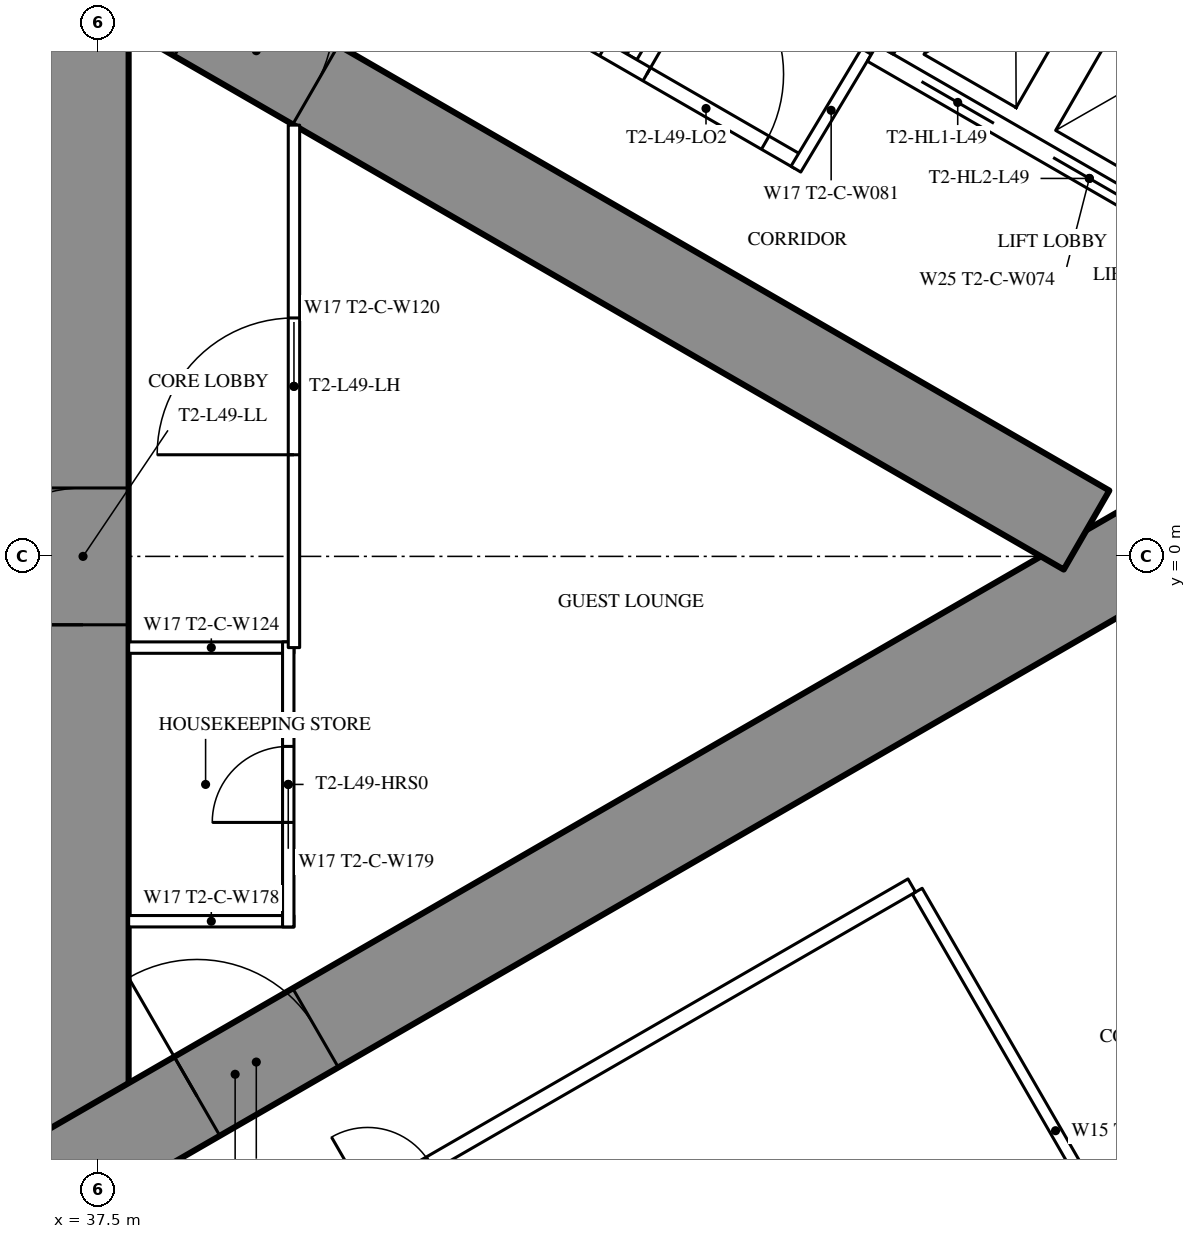
"""IFC4 building model, lengths in metres.
Left out: names, types, materials, properties, quantities, classifications, styles, units other than length and angle.
Written with IfcOpenShell. Run it as: python <this file> out.ifc"""

import sys

from ifc_helpers import new_model, si_unit, direction, frame, frame_2d, origin, place, context, subcontext, project, spatial, rectangle, extrude, element, fill, save


model = new_model("IFC4")
c1 = context("Model", 3, precision=1e-05, world=origin(), true_north=direction((0.0, 1.0)))
c2 = subcontext(c1, "Body", "Model", "MODEL_VIEW")
j1 = project(units=[si_unit("LENGTHUNIT", "METRE"), si_unit("PLANEANGLEUNIT", "RADIAN")], contexts=[c1])
p1 = place(None, origin())
s1 = spatial("IfcSite", under=j1, at=p1, CompositionType="ELEMENT")
p2 = place(p1, origin())
s2 = spatial("IfcBuilding", under=s1, at=p2, CompositionType="ELEMENT")
p3 = place(p2, frame((0.0, 0.0, 184.3)))
s3 = spatial("IfcBuildingStorey", under=s2, at=p3, CompositionType="ELEMENT", Elevation=184.3)
p4 = place(p3, frame((37.3, -8.6, 0.0), z_axis=(0.0, 0.0, 1.0), x_axis=(0.0, 1.0, 0.0)))
e1 = element("IfcWall", 1, at=p4, inside=s3, PredefinedType="SHEAR", context=c2, shape_type="SweptSolid", body=[
    extrude(rectangle(XDim=17.2, YDim=1.2, at=frame_2d((8.6, 0.0))), origin(), (0.0, 0.0, 1.0), 3.5),
])
p5 = place(p4, frame((7.7, 0.0, 0.0)))
e2 = element("IfcOpeningElement", 2, at=p5, cuts=e1, PredefinedType="OPENING", context=c2, shape_type="SweptSolid", body=[
    extrude(rectangle(XDim=1.8, YDim=2.2, at=frame_2d((0.9, 1.1))), frame((0.0, 0.61, 0.0), z_axis=(0.0, -1.0, 0.0), x_axis=(1.0, 0.0, 0.0)), (0.0, 0.0, 1.0), 1.22),
])
p6 = place(p3, frame((27.2, -13.8, 0.0), z_axis=(0.0, 0.0, 1.0), x_axis=(0.866027159892, 0.499996958321, 0.0)))
e3 = element("IfcWall", 3, at=p6, inside=s3, PredefinedType="SHEAR", context=c2, shape_type="SweptSolid", body=[
    extrude(rectangle(XDim=27.947, YDim=1.2, at=frame_2d((13.973, 0.0))), origin(), (0.0, 0.0, 1.0), 3.5),
])
p7 = place(p6, frame((4.6, 0.0, 0.0)))
e4 = element("IfcOpeningElement", 4, at=p7, cuts=e3, PredefinedType="OPENING", context=c2, shape_type="SweptSolid", body=[
    extrude(rectangle(XDim=1.0, YDim=2.2, at=frame_2d((0.5, 1.1))), frame((0.0, 0.61, 0.0), z_axis=(0.0, -1.0, 0.0), x_axis=(1.0, 0.0, 0.0)), (0.0, 0.0, 1.0), 1.22),
])
p8 = place(p6, frame((13.395, 0.0, 0.0)))
e5 = element("IfcOpeningElement", 5, at=p8, cuts=e3, PredefinedType="OPENING", context=c2, shape_type="SweptSolid", body=[
    extrude(rectangle(XDim=1.8, YDim=2.2, at=frame_2d((0.9, 1.1))), frame((0.0, 0.61, 0.0), z_axis=(0.0, -1.0, 0.0), x_axis=(1.0, 0.0, 0.0)), (0.0, 0.0, 1.0), 1.22),
])
p9 = place(p3, frame((27.2, 13.8, 0.0), z_axis=(0.0, 0.0, 1.0), x_axis=(0.866024515034, -0.500001539357, 0.0)))
e6 = element("IfcWall", 6, at=p9, inside=s3, PredefinedType="SHEAR", context=c2, shape_type="SweptSolid", body=[
    extrude(rectangle(XDim=26.907, YDim=1.2, at=frame_2d((13.454, 0.0))), origin(), (0.0, 0.0, 1.0), 3.5),
])
p10 = place(p9, frame((4.6, 0.0, 0.0)))
e7 = element("IfcOpeningElement", 7, at=p10, cuts=e6, PredefinedType="OPENING", context=c2, shape_type="SweptSolid", body=[
    extrude(rectangle(XDim=1.0, YDim=2.2, at=frame_2d((0.5, 1.1))), frame((0.0, 0.61, 0.0), z_axis=(0.0, -1.0, 0.0), x_axis=(1.0, 0.0, 0.0)), (0.0, 0.0, 1.0), 1.22),
])
p11 = place(p9, frame((13.395, 0.0, 0.0)))
e8 = element("IfcOpeningElement", 8, at=p11, cuts=e6, PredefinedType="OPENING", context=c2, shape_type="SweptSolid", body=[
    extrude(rectangle(XDim=1.8, YDim=2.2, at=frame_2d((0.9, 1.1))), frame((0.0, 0.61, 0.0), z_axis=(0.0, -1.0, 0.0), x_axis=(1.0, 0.0, 0.0)), (0.0, 0.0, 1.0), 1.22),
])
p12 = place(p3, frame((48.275, -4.404, 0.0), z_axis=(0.0, 0.0, 1.0), x_axis=(0.500006004368, -0.866021937133, 0.0)))
e9 = element("IfcWall", 9, at=p12, inside=s3, PredefinedType="PARTITIONING", context=c2, shape_type="SweptSolid", body=[
    extrude(rectangle(XDim=7.279, YDim=0.15, at=frame_2d((3.64, 0.0))), origin(), (0.0, 0.0, 1.0), 2.3),
])
p13 = place(p3, frame((44.521, 6.571, 0.0), z_axis=(0.0, 0.0, 1.0), x_axis=(0.500020376429, 0.866013639128, 0.0)))
e10 = element("IfcWall", 10, at=p13, inside=s3, PredefinedType="PARTITIONING", context=c2, shape_type="SweptSolid", body=[
    extrude(rectangle(XDim=7.306, YDim=0.15, at=frame_2d((3.653, 0.0))), origin(), (0.0, 0.0, 1.0), 2.3),
])
p14 = place(p3, frame((27.959, 16.017, 0.0), z_axis=(0.0, 0.0, 1.0), x_axis=(0.866027146794, -0.499996981007, 0.0)))
e11 = element("IfcWall", 11, at=p14, inside=s3, PredefinedType="PARTITIONING", context=c2, shape_type="SweptSolid", body=[
    extrude(rectangle(XDim=21.657, YDim=0.2, at=frame_2d((10.829, 0.0))), origin(), (0.0, 0.0, 1.0), 3.25),
])
p15 = place(p14, frame((17.741, 0.0, 0.0)))
e12 = element("IfcOpeningElement", 12, at=p15, cuts=e11, PredefinedType="OPENING", context=c2, shape_type="SweptSolid", body=[
    extrude(rectangle(XDim=0.95, YDim=2.2, at=frame_2d((0.475, 1.1))), frame((0.0, 0.11, 0.0), z_axis=(0.0, -1.0, 0.0), x_axis=(1.0, 0.0, 0.0)), (0.0, 0.0, 1.0), 0.22),
])
p16 = place(p14, frame((10.782, 0.0, 0.0)))
e13 = element("IfcOpeningElement", 13, at=p16, cuts=e11, PredefinedType="OPENING", context=c2, shape_type="SweptSolid", body=[
    extrude(rectangle(XDim=0.95, YDim=2.2, at=frame_2d((0.475, 1.1))), frame((0.0, 0.11, 0.0), z_axis=(0.0, -1.0, 0.0), x_axis=(1.0, 0.0, 0.0)), (0.0, 0.0, 1.0), 0.22),
])
p17 = place(p14, frame((6.732, 0.0, 0.0)))
e14 = element("IfcOpeningElement", 14, at=p17, cuts=e11, PredefinedType="OPENING", context=c2, shape_type="SweptSolid", body=[
    extrude(rectangle(XDim=0.95, YDim=2.2, at=frame_2d((0.475, 1.1))), frame((0.0, 0.11, 0.0), z_axis=(0.0, -1.0, 0.0), x_axis=(1.0, 0.0, 0.0)), (0.0, 0.0, 1.0), 0.22),
])
p18 = place(p14, frame((19.349, 0.0, 0.0)))
e15 = element("IfcOpeningElement", 15, at=p18, cuts=e11, PredefinedType="OPENING", context=c2, shape_type="SweptSolid", body=[
    extrude(rectangle(XDim=1.8, YDim=2.2, at=frame_2d((0.9, 1.1))), frame((0.0, 0.11, 0.0), z_axis=(0.0, -1.0, 0.0), x_axis=(1.0, 0.0, 0.0)), (0.0, 0.0, 1.0), 0.22),
])
p19 = place(p3, frame((47.606, 6.643, 0.0), z_axis=(0.0, 0.0, 1.0), x_axis=(-0.514237157483, -0.857648031458, 0.0)))
e16 = element("IfcWall", 16, at=p19, inside=s3, PredefinedType="PARTITIONING", context=c2, shape_type="SweptSolid", body=[
    extrude(rectangle(XDim=1.805, YDim=0.15, at=frame_2d((0.902, 0.0))), origin(), (0.0, 0.0, 1.0), 3.25),
])
p20 = place(p3, frame((27.959, -16.017, 0.0), z_axis=(0.0, 0.0, 1.0), x_axis=(0.866024180982, 0.50000211795, 0.0)))
e17 = element("IfcWall", 17, at=p20, inside=s3, PredefinedType="PARTITIONING", context=c2, shape_type="SweptSolid", body=[
    extrude(rectangle(XDim=23.375, YDim=0.2, at=frame_2d((11.688, 0.0))), origin(), (0.0, 0.0, 1.0), 3.25),
])
p21 = place(p20, frame((2.415, 0.0, 0.0)))
e18 = element("IfcOpeningElement", 18, at=p21, cuts=e17, PredefinedType="OPENING", context=c2, shape_type="SweptSolid", body=[
    extrude(rectangle(XDim=0.95, YDim=2.2, at=frame_2d((0.475, 1.1))), frame((0.0, 0.11, 0.0), z_axis=(0.0, -1.0, 0.0), x_axis=(1.0, 0.0, 0.0)), (0.0, 0.0, 1.0), 0.22),
])
p22 = place(p20, frame((9.215, 0.0, 0.0)))
e19 = element("IfcOpeningElement", 19, at=p22, cuts=e17, PredefinedType="OPENING", context=c2, shape_type="SweptSolid", body=[
    extrude(rectangle(XDim=1.0, YDim=2.2, at=frame_2d((0.5, 1.1))), frame((0.0, 0.11, 0.0), z_axis=(0.0, -1.0, 0.0), x_axis=(1.0, 0.0, 0.0)), (0.0, 0.0, 1.0), 0.22),
])
p23 = place(p20, frame((15.109, 0.0, 0.0)))
e20 = element("IfcOpeningElement", 20, at=p23, cuts=e17, PredefinedType="OPENING", context=c2, shape_type="SweptSolid", body=[
    extrude(rectangle(XDim=0.95, YDim=2.2, at=frame_2d((0.475, 1.1))), frame((0.0, 0.11, 0.0), z_axis=(0.0, -1.0, 0.0), x_axis=(1.0, 0.0, 0.0)), (0.0, 0.0, 1.0), 0.22),
])
for number, where, z_axis, x_axis in (
    (21, (37.9, -1.2, 0.0), (0.0, 0.0, 1.0), (1.0, 0.0, 0.0)),
    (22, (37.9, -4.8, 0.0), (0.0, 0.0, 1.0), (1.0, 0.0, 0.0)),
):
    element("IfcWall", number, at=place(p3, frame(where, z_axis=z_axis, x_axis=x_axis)), inside=s3, PredefinedType="PARTITIONING", context=c2, shape_type="SweptSolid", body=[
        extrude(rectangle(XDim=2.175, YDim=0.15, at=frame_2d((1.087, 0.0))), origin(), (0.0, 0.0, 1.0), 3.25),
    ])
p24 = place(p3, frame((40.0, -4.875, 0.0), z_axis=(0.0, 0.0, 1.0), x_axis=(0.0, 1.0, 0.0)))
e23 = element("IfcWall", 23, at=p24, inside=s3, PredefinedType="PARTITIONING", context=c2, shape_type="SweptSolid", body=[
    extrude(rectangle(XDim=3.75, YDim=0.15, at=frame_2d((1.875, 0.0))), origin(), (0.0, 0.0, 1.0), 3.25),
])
p25 = place(p24, frame((1.375, 0.0, 0.0)))
e24 = element("IfcOpeningElement", 24, at=p25, cuts=e23, PredefinedType="OPENING", context=c2, shape_type="SweptSolid", body=[
    extrude(rectangle(XDim=1.0, YDim=2.2, at=frame_2d((0.5, 1.1))), frame((0.0, 0.085, 0.0), z_axis=(0.0, -1.0, 0.0), x_axis=(1.0, 0.0, 0.0)), (0.0, 0.0, 1.0), 0.17),
])
p26 = place(p3, frame((40.075, -1.2, 0.0), z_axis=(0.0, 0.0, 1.0), x_axis=(0.0, 1.0, 0.0)))
e25 = element("IfcWall", 25, at=p26, inside=s3, PredefinedType="PARTITIONING", context=c2, shape_type="SweptSolid", body=[
    extrude(rectangle(XDim=6.874, YDim=0.15, at=frame_2d((3.437, 0.0))), origin(), (0.0, 0.0, 1.0), 3.25),
])
p27 = place(p26, frame((2.537, 0.0, 0.0)))
e26 = element("IfcOpeningElement", 26, at=p27, cuts=e25, PredefinedType="OPENING", context=c2, shape_type="SweptSolid", body=[
    extrude(rectangle(XDim=1.8, YDim=2.2, at=frame_2d((0.9, 1.1))), frame((0.0, 0.085, 0.0), z_axis=(0.0, -1.0, 0.0), x_axis=(1.0, 0.0, 0.0)), (0.0, 0.0, 1.0), 0.17),
])
p28 = place(p3, frame((47.681, 6.622, 0.0), z_axis=(0.0, 0.0, 1.0), x_axis=(0.86603344179, -0.499986077507, 0.0)))
e27 = element("IfcWall", 27, at=p28, inside=s3, PredefinedType="PARTITIONING", context=c2, shape_type="SweptSolid", body=[
    extrude(rectangle(XDim=6.6, YDim=0.25, at=frame_2d((3.3, 0.0))), origin(), (0.0, 0.0, 1.0), 3.25),
])
p29 = place(p28, frame((0.75, 0.0, 0.0)))
e28 = element("IfcOpeningElement", 28, at=p29, cuts=e27, PredefinedType="OPENING", context=c2, shape_type="SweptSolid", body=[
    extrude(rectangle(XDim=1.1, YDim=2.2, at=frame_2d((0.55, 1.1))), frame((0.0, 0.135, 0.0), z_axis=(0.0, -1.0, 0.0), x_axis=(1.0, 0.0, 0.0)), (0.0, 0.0, 1.0), 0.27),
])
p30 = place(p28, frame((2.75, 0.0, 0.0)))
e29 = element("IfcOpeningElement", 29, at=p30, cuts=e27, PredefinedType="OPENING", context=c2, shape_type="SweptSolid", body=[
    extrude(rectangle(XDim=1.1, YDim=2.2, at=frame_2d((0.55, 1.1))), frame((0.0, 0.135, 0.0), z_axis=(0.0, -1.0, 0.0), x_axis=(1.0, 0.0, 0.0)), (0.0, 0.0, 1.0), 0.27),
])
p31 = place(p28, frame((4.75, 0.0, 0.0)))
e30 = element("IfcOpeningElement", 30, at=p31, cuts=e27, PredefinedType="OPENING", context=c2, shape_type="SweptSolid", body=[
    extrude(rectangle(XDim=1.1, YDim=2.2, at=frame_2d((0.55, 1.1))), frame((0.0, 0.135, 0.0), z_axis=(0.0, -1.0, 0.0), x_axis=(1.0, 0.0, 0.0)), (0.0, 0.0, 1.0), 0.27),
])
p32 = place(p3, frame((49.406, 9.611, 0.0), z_axis=(0.0, 0.0, 1.0), x_axis=(0.86603344179, -0.499986077507, 0.0)))
e31 = element("IfcWall", 31, at=p32, inside=s3, PredefinedType="PARTITIONING", context=c2, shape_type="SweptSolid", body=[
    extrude(rectangle(XDim=6.6, YDim=0.25, at=frame_2d((3.3, 0.0))), origin(), (0.0, 0.0, 1.0), 3.25),
])
p33 = place(p3, frame((47.852, 6.668, 0.0), z_axis=(0.0, 0.0, 1.0), x_axis=(0.499929347863, 0.866066190972, 0.0)))
e32 = element("IfcWall", 32, at=p33, inside=s3, PredefinedType="PARTITIONING", context=c2, shape_type="SweptSolid", body=[
    extrude(rectangle(XDim=3.201, YDim=0.25, at=frame_2d((1.6, 0.0))), origin(), (0.0, 0.0, 1.0), 3.25),
])
p34 = place(p18, origin())
e33 = element("IfcDoor", 33, at=p34, inside=s3, OperationType="DOUBLE_DOOR_SINGLE_SWING", PredefinedType="DOOR", context=c2, shape_type="SweptSolid", body=[
    extrude(rectangle(XDim=1.8, YDim=2.2, at=frame_2d((0.9, 1.1))), frame((0.0, 0.025, 0.0), z_axis=(0.0, -1.0, 0.0), x_axis=(1.0, 0.0, 0.0)), (0.0, 0.0, 1.0), 0.05),
])
fill(e15, e33)
p35 = place(p25, origin())
e34 = element("IfcDoor", 34, at=p35, inside=s3, OperationType="SINGLE_SWING_LEFT", PredefinedType="DOOR", context=c2, shape_type="SweptSolid", body=[
    extrude(rectangle(XDim=1.0, YDim=2.2, at=frame_2d((0.5, 1.1))), frame((0.0, 0.025, 0.0), z_axis=(0.0, -1.0, 0.0), x_axis=(1.0, 0.0, 0.0)), (0.0, 0.0, 1.0), 0.05),
])
fill(e24, e34)
p36 = place(p27, origin())
e35 = element("IfcDoor", 35, at=p36, inside=s3, OperationType="DOUBLE_DOOR_SINGLE_SWING", PredefinedType="DOOR", context=c2, shape_type="SweptSolid", body=[
    extrude(rectangle(XDim=1.8, YDim=2.2, at=frame_2d((0.9, 1.1))), frame((0.0, 0.025, 0.0), z_axis=(0.0, -1.0, 0.0), x_axis=(1.0, 0.0, 0.0)), (0.0, 0.0, 1.0), 0.05),
])
fill(e26, e35)
p37 = place(p8, origin())
e36 = element("IfcDoor", 36, at=p37, inside=s3, OperationType="DOUBLE_DOOR_SINGLE_SWING", PredefinedType="DOOR", context=c2, shape_type="SweptSolid", body=[
    extrude(rectangle(XDim=1.8, YDim=2.2, at=frame_2d((0.9, 1.1))), frame((0.0, 0.025, 0.0), z_axis=(0.0, -1.0, 0.0), x_axis=(1.0, 0.0, 0.0)), (0.0, 0.0, 1.0), 0.05),
])
fill(e5, e36)
p38 = place(p11, origin())
e37 = element("IfcDoor", 37, at=p38, inside=s3, OperationType="DOUBLE_DOOR_SINGLE_SWING", PredefinedType="DOOR", context=c2, shape_type="SweptSolid", body=[
    extrude(rectangle(XDim=1.8, YDim=2.2, at=frame_2d((0.9, 1.1))), frame((0.0, 0.025, 0.0), z_axis=(0.0, -1.0, 0.0), x_axis=(1.0, 0.0, 0.0)), (0.0, 0.0, 1.0), 0.05),
])
fill(e8, e37)
p39 = place(p5, origin())
e38 = element("IfcDoor", 38, at=p39, inside=s3, OperationType="DOUBLE_DOOR_SINGLE_SWING", PredefinedType="DOOR", context=c2, shape_type="SweptSolid", body=[
    extrude(rectangle(XDim=1.8, YDim=2.2, at=frame_2d((0.9, 1.1))), frame((0.0, 0.025, 0.0), z_axis=(0.0, -1.0, 0.0), x_axis=(1.0, 0.0, 0.0)), (0.0, 0.0, 1.0), 0.05),
])
fill(e2, e38)
p40 = place(p29, origin())
e39 = element("IfcDoor", 39, at=p40, inside=s3, OperationType="DOUBLE_DOOR_SLIDING", PredefinedType="USERDEFINED", context=c2, shape_type="SweptSolid", body=[
    extrude(rectangle(XDim=1.1, YDim=2.2, at=frame_2d((0.55, 1.1))), frame((0.0, 0.025, 0.0), z_axis=(0.0, -1.0, 0.0), x_axis=(1.0, 0.0, 0.0)), (0.0, 0.0, 1.0), 0.05),
])
fill(e28, e39)
p41 = place(p30, origin())
e40 = element("IfcDoor", 40, at=p41, inside=s3, OperationType="DOUBLE_DOOR_SLIDING", PredefinedType="USERDEFINED", context=c2, shape_type="SweptSolid", body=[
    extrude(rectangle(XDim=1.1, YDim=2.2, at=frame_2d((0.55, 1.1))), frame((0.0, 0.025, 0.0), z_axis=(0.0, -1.0, 0.0), x_axis=(1.0, 0.0, 0.0)), (0.0, 0.0, 1.0), 0.05),
])
fill(e29, e40)
save(model, sys.argv[1])
